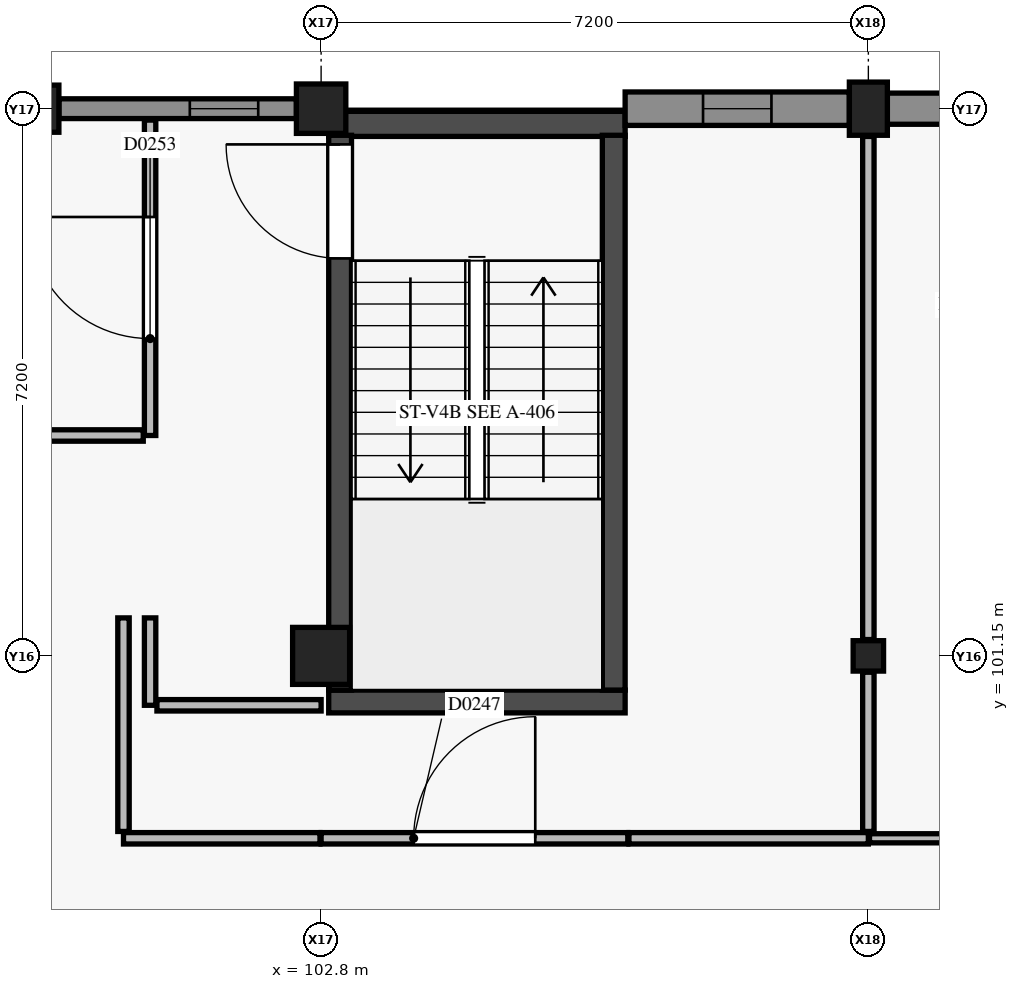
"""IFC4 building model, lengths in metres.
Left out: names, types, materials, properties, quantities, classifications, styles, units other than length and angle.
Written with IfcOpenShell. Run it as: python <this file> out.ifc"""

import sys

from ifc_helpers import new_model, si_unit, direction, frame, frame_2d, origin, origin_2d, place, context, subcontext, project, spatial, rectangle, circle, extrude, element, fill, save


model = new_model("IFC4")
c1 = context("Model", 3, precision=1e-05, world=origin(), true_north=direction((0.0, 1.0)))
c2 = subcontext(c1, "Body", "Model", "MODEL_VIEW")
j1 = project(units=[si_unit("LENGTHUNIT", "METRE"), si_unit("PLANEANGLEUNIT", "RADIAN")], contexts=[c1])
p1 = place(None, origin())
s1 = spatial("IfcSite", under=j1, at=p1, CompositionType="ELEMENT")
p2 = place(p1, origin())
s2 = spatial("IfcBuilding", under=s1, at=p2, CompositionType="ELEMENT")
p3 = place(p2, frame((0.0, 0.0, 9.0)))
s3 = spatial("IfcBuildingStorey", under=s2, at=p3, CompositionType="ELEMENT", Elevation=9.0)
p4 = place(p3, frame((102.8, 101.15, 0.0), z_axis=(0.0, 0.0, 1.0), x_axis=(1.0, 0.0, 0.0)))
e1 = element("IfcColumn", 1, at=p4, inside=s3, PredefinedType="COLUMN", context=c2, shape_type="SweptSolid", body=[
    extrude(rectangle(XDim=0.75, YDim=0.75, at=origin_2d()), origin(), (0.0, 0.0, 1.0), 4.2),
])
p5 = place(p3, frame((102.8, 108.35, 0.0), z_axis=(0.0, 0.0, 1.0), x_axis=(1.0, 0.0, 0.0)))
e2 = element("IfcColumn", 2, at=p5, inside=s3, PredefinedType="COLUMN", context=c2, shape_type="SweptSolid", body=[
    extrude(circle(Radius=0.325, at=origin_2d()), origin(), (0.0, 0.0, 1.0), 4.2),
])
p6 = place(p3, frame((110.0, 101.15, 0.0), z_axis=(0.0, 0.0, 1.0), x_axis=(1.0, 0.0, 0.0)))
e3 = element("IfcColumn", 3, at=p6, inside=s3, PredefinedType="COLUMN", context=c2, shape_type="SweptSolid", body=[
    extrude(rectangle(XDim=0.4, YDim=0.4, at=origin_2d()), origin(), (0.0, 0.0, 1.0), 4.2),
])
p7 = place(p3, frame((110.0, 108.35, 0.0), z_axis=(0.0, 0.0, 1.0), x_axis=(1.0, 0.0, 0.0)))
e4 = element("IfcColumn", 4, at=p7, inside=s3, PredefinedType="COLUMN", context=c2, shape_type="SweptSolid", body=[
    extrude(rectangle(XDim=0.5, YDim=0.7, at=origin_2d()), origin(), (0.0, 0.0, 1.0), 4.2),
])
p8 = place(p3, frame((99.2, 108.35, 0.0), z_axis=(0.0, 0.0, 1.0), x_axis=(1.0, 0.0, 0.0)))
e5 = element("IfcColumn", 5, at=p8, inside=s3, PredefinedType="PILASTER", context=c2, shape_type="SweptSolid", body=[
    extrude(rectangle(XDim=0.3, YDim=0.62, at=origin_2d()), origin(), (0.0, 0.0, 1.0), 4.2),
])
p9 = place(p3, frame((102.9, 100.55, 0.0), z_axis=(0.0, 0.0, 1.0), x_axis=(1.0, 0.0, 0.0)))
e6 = element("IfcWall", 6, at=p9, inside=s3, PredefinedType="SHEAR", context=c2, shape_type="SweptSolid", body=[
    extrude(rectangle(XDim=3.9, YDim=0.3, at=frame_2d((1.95, 0.0))), origin(), (0.0, 0.0, 1.0), 3.95),
])
p10 = place(p3, frame((102.9, 108.15, 0.0), z_axis=(0.0, 0.0, 1.0), x_axis=(1.0, 0.0, 0.0)))
e7 = element("IfcWall", 7, at=p10, inside=s3, PredefinedType="SHEAR", context=c2, shape_type="SweptSolid", body=[
    extrude(rectangle(XDim=3.9, YDim=0.33, at=frame_2d((1.95, 0.0))), origin(), (0.0, 0.0, 1.0), 3.95),
])
p11 = place(p3, frame((103.05, 100.7, 0.0), z_axis=(0.0, 0.0, 1.0), x_axis=(0.0, 1.0, 0.0)))
e8 = element("IfcWall", 8, at=p11, inside=s3, PredefinedType="SHEAR", context=c2, shape_type="SweptSolid", body=[
    extrude(rectangle(XDim=7.3, YDim=0.3, at=frame_2d((3.65, 0.0))), origin(), (0.0, 0.0, 1.0), 3.95),
])
p12 = place(p11, frame((5.68, 0.0, 0.0)))
e9 = element("IfcOpeningElement", 9, at=p12, cuts=e8, PredefinedType="OPENING", context=c2, shape_type="SweptSolid", body=[
    extrude(rectangle(XDim=1.5, YDim=2.15, at=frame_2d((0.75, 1.075))), frame((0.0, 0.16, 0.0), z_axis=(0.0, -1.0, 0.0), x_axis=(1.0, 0.0, 0.0)), (0.0, 0.0, 1.0), 0.32),
])
p13 = place(p3, frame((106.65, 100.7, 0.0), z_axis=(0.0, 0.0, 1.0), x_axis=(0.0, 1.0, 0.0)))
e10 = element("IfcWall", 10, at=p13, inside=s3, PredefinedType="SHEAR", context=c2, shape_type="SweptSolid", body=[
    extrude(rectangle(XDim=7.3, YDim=0.3, at=frame_2d((3.65, 0.0))), origin(), (0.0, 0.0, 1.0), 3.95),
])
p14 = place(p3, frame((99.35, 108.35, 0.0), z_axis=(0.0, 0.0, 1.0), x_axis=(1.0, 0.0, 0.0)))
e11 = element("IfcWall", 11, at=p14, inside=s3, PredefinedType="SOLIDWALL", context=c2, shape_type="SweptSolid", body=[
    extrude(rectangle(XDim=3.125, YDim=0.26, at=frame_2d((1.562, 0.0))), origin(), (0.0, 0.0, 1.0), 3.13),
])
p15 = place(p14, frame((1.722, 0.0, 0.95)))
e12 = element("IfcOpeningElement", 12, at=p15, cuts=e11, PredefinedType="OPENING", context=c2, shape_type="SweptSolid", body=[
    extrude(rectangle(XDim=0.9, YDim=1.2, at=frame_2d((0.45, 0.6))), frame((0.0, 0.14, 0.0), z_axis=(0.0, -1.0, 0.0), x_axis=(1.0, 0.0, 0.0)), (0.0, 0.0, 1.0), 0.28),
])
p16 = place(p3, frame((106.8, 108.35, 0.0), z_axis=(0.0, 0.0, 1.0), x_axis=(1.0, 0.0, 0.0)))
e13 = element("IfcWall", 13, at=p16, inside=s3, PredefinedType="USERDEFINED", context=c2, shape_type="SweptSolid", body=[
    extrude(rectangle(XDim=2.95, YDim=0.44, at=frame_2d((1.475, 0.0))), origin(), (0.0, 0.0, 1.0), 3.13),
])
p17 = place(p16, frame((1.025, 0.0, 0.9)))
e14 = element("IfcOpeningElement", 14, at=p17, cuts=e13, PredefinedType="OPENING", context=c2, shape_type="SweptSolid", body=[
    extrude(rectangle(XDim=0.9, YDim=1.2, at=frame_2d((0.45, 0.6))), frame((0.0, 0.23, 0.0), z_axis=(0.0, -1.0, 0.0), x_axis=(1.0, 0.0, 0.0)), (0.0, 0.0, 1.0), 0.46),
])
p18 = place(p3, frame((110.25, 108.35, 0.0), z_axis=(0.0, 0.0, 1.0), x_axis=(1.0, 0.0, 0.0)))
e15 = element("IfcWall", 15, at=p18, inside=s3, PredefinedType="USERDEFINED", context=c2, shape_type="SweptSolid", body=[
    extrude(rectangle(XDim=3.21, YDim=0.41, at=frame_2d((1.605, 0.0))), origin(), (0.0, 0.0, 1.0), 3.13),
])
p19 = place(p18, frame((0.705, 0.0, 0.9)))
e16 = element("IfcOpeningElement", 16, at=p19, cuts=e15, PredefinedType="OPENING", context=c2, shape_type="SweptSolid", body=[
    extrude(rectangle(XDim=1.8, YDim=0.9, at=frame_2d((0.9, 0.45))), frame((0.0, 0.215, 0.0), z_axis=(0.0, -1.0, 0.0), x_axis=(1.0, 0.0, 0.0)), (0.0, 0.0, 1.0), 0.43),
])
p20 = place(p3, frame((100.55, 100.5, 0.0), z_axis=(0.0, 0.0, 1.0), x_axis=(0.0, 1.0, 0.0)))
e17 = element("IfcWall", 17, at=p20, inside=s3, PredefinedType="PARTITIONING", context=c2, shape_type="SweptSolid", body=[
    extrude(rectangle(XDim=1.15, YDim=0.15, at=frame_2d((0.575, 0.0))), origin(), (0.0, 0.0, 1.0), 3.135),
])
p21 = place(p3, frame((100.64, 100.5, 0.0), z_axis=(0.0, 0.0, 1.0), x_axis=(1.0, 0.0, 0.0)))
e18 = element("IfcWall", 18, at=p21, inside=s3, PredefinedType="PARTITIONING", context=c2, shape_type="SweptSolid", body=[
    extrude(rectangle(XDim=2.16, YDim=0.15, at=frame_2d((1.08, 0.0))), origin(), (0.0, 0.0, 1.0), 3.415),
])
p22 = place(p3, frame((106.85, 98.75, 0.0), z_axis=(0.0, 0.0, 1.0), x_axis=(1.0, 0.0, 0.0)))
e19 = element("IfcWall", 19, at=p22, inside=s3, PredefinedType="PARTITIONING", context=c2, shape_type="SweptSolid", body=[
    extrude(rectangle(XDim=3.15, YDim=0.15, at=frame_2d((1.575, 0.0))), origin(), (0.0, 0.0, 1.0), 3.285),
])
p23 = place(p3, frame((102.8, 98.75, 0.0), z_axis=(0.0, 0.0, 1.0), x_axis=(1.0, 0.0, 0.0)))
e20 = element("IfcWall", 20, at=p23, inside=s3, PredefinedType="PARTITIONING", context=c2, shape_type="SweptSolid", body=[
    extrude(rectangle(XDim=4.035, YDim=0.15, at=frame_2d((2.018, 0.0))), origin(), (0.0, 0.0, 1.0), 3.415),
])
p24 = place(p23, frame((1.218, 0.0, 0.0)))
e21 = element("IfcOpeningElement", 21, at=p24, cuts=e20, PredefinedType="OPENING", context=c2, shape_type="SweptSolid", body=[
    extrude(rectangle(XDim=1.6, YDim=2.25, at=frame_2d((0.8, 1.125))), frame((0.0, 0.085, 0.0), z_axis=(0.0, -1.0, 0.0), x_axis=(1.0, 0.0, 0.0)), (0.0, 0.0, 1.0), 0.17),
])
p25 = place(p3, frame((100.2, 98.75, 0.0), z_axis=(0.0, 0.0, 1.0), x_axis=(1.0, 0.0, 0.0)))
e22 = element("IfcWall", 22, at=p25, inside=s3, PredefinedType="PARTITIONING", context=c2, shape_type="SweptSolid", body=[
    extrude(rectangle(XDim=2.585, YDim=0.15, at=frame_2d((1.292, 0.0))), origin(), (0.0, 0.0, 1.0), 3.415),
])
p26 = place(p3, frame((100.2, 98.84, 0.0), z_axis=(0.0, 0.0, 1.0), x_axis=(0.0, 1.0, 0.0)))
e23 = element("IfcWall", 23, at=p26, inside=s3, PredefinedType="PARTITIONING", context=c2, shape_type="SweptSolid", body=[
    extrude(rectangle(XDim=2.81, YDim=0.15, at=frame_2d((1.405, 0.0))), origin(), (0.0, 0.0, 1.0), 3.135),
])
p27 = place(p3, frame((100.55, 104.05, 0.0), z_axis=(0.0, 0.0, 1.0), x_axis=(0.0, 1.0, 0.0)))
e24 = element("IfcWall", 24, at=p27, inside=s3, PredefinedType="PARTITIONING", context=c2, shape_type="SweptSolid", body=[
    extrude(rectangle(XDim=4.15, YDim=0.15, at=frame_2d((2.075, 0.0))), origin(), (0.0, 0.0, 1.0), 3.475),
])
p28 = place(p27, frame((1.275, 0.0, 0.0)))
e25 = element("IfcOpeningElement", 25, at=p28, cuts=e24, PredefinedType="OPENING", context=c2, shape_type="SweptSolid", body=[
    extrude(rectangle(XDim=1.6, YDim=2.25, at=frame_2d((0.8, 1.125))), frame((0.0, 0.085, 0.0), z_axis=(0.0, -1.0, 0.0), x_axis=(1.0, 0.0, 0.0)), (0.0, 0.0, 1.0), 0.17),
])
p29 = place(p3, frame((99.05, 104.05, 0.0), z_axis=(0.0, 0.0, 1.0), x_axis=(1.0, 0.0, 0.0)))
e26 = element("IfcWall", 26, at=p29, inside=s3, PredefinedType="PARTITIONING", context=c2, shape_type="SweptSolid", body=[
    extrude(rectangle(XDim=1.41, YDim=0.15, at=frame_2d((0.705, 0.0))), origin(), (0.0, 0.0, 1.0), 3.95),
])
p30 = place(p3, frame((110.015, 98.75, 0.0), z_axis=(0.0, 0.0, 1.0), x_axis=(1.0, 0.0, 0.0)))
e27 = element("IfcWall", 27, at=p30, inside=s3, PredefinedType="PARTITIONING", context=c2, shape_type="SweptSolid", body=[
    extrude(rectangle(XDim=2.31, YDim=0.12, at=frame_2d((1.155, 0.0))), origin(), (0.0, 0.0, 1.0), 3.285),
])
p31 = place(p3, frame((110.0, 98.84, 0.0), z_axis=(0.0, 0.0, 1.0), x_axis=(0.0, 1.0, 0.0)))
e28 = element("IfcWall", 28, at=p31, inside=s3, PredefinedType="PARTITIONING", context=c2, shape_type="SweptSolid", body=[
    extrude(rectangle(XDim=2.095, YDim=0.15, at=frame_2d((1.047, 0.0))), origin(), (0.0, 0.0, 1.0), 3.285),
])
p32 = place(p3, frame((110.0, 101.365, 0.0), z_axis=(0.0, 0.0, 1.0), x_axis=(0.0, 1.0, 0.0)))
e29 = element("IfcWall", 29, at=p32, inside=s3, PredefinedType="PARTITIONING", context=c2, shape_type="SweptSolid", body=[
    extrude(rectangle(XDim=6.62, YDim=0.15, at=frame_2d((3.31, 0.0))), origin(), (0.0, 0.0, 1.0), 3.285),
])
p33 = place(p15, origin())
e30 = element("IfcWindow", 30, at=p33, inside=s3, PartitioningType="SINGLE_PANEL", PredefinedType="WINDOW", context=c2, shape_type="SweptSolid", body=[
    extrude(rectangle(XDim=0.9, YDim=1.2, at=frame_2d((0.45, 0.6))), frame((0.0, 0.03, 0.0), z_axis=(0.0, -1.0, 0.0), x_axis=(1.0, 0.0, 0.0)), (0.0, 0.0, 1.0), 0.06),
])
fill(e12, e30)
p34 = place(p17, origin())
e31 = element("IfcWindow", 31, at=p34, inside=s3, PartitioningType="SINGLE_PANEL", PredefinedType="WINDOW", context=c2, shape_type="SweptSolid", body=[
    extrude(rectangle(XDim=0.9, YDim=1.2, at=frame_2d((0.45, 0.6))), frame((0.0, 0.03, 0.0), z_axis=(0.0, -1.0, 0.0), x_axis=(1.0, 0.0, 0.0)), (0.0, 0.0, 1.0), 0.06),
])
fill(e14, e31)
p35 = place(p12, origin())
e32 = element("IfcDoor", 32, at=p35, inside=s3, OperationType="SINGLE_SWING_RIGHT", PredefinedType="DOOR", context=c2, shape_type="SweptSolid", body=[
    extrude(rectangle(XDim=1.5, YDim=2.15, at=frame_2d((0.75, 1.075))), frame((0.0, 0.025, 0.0), z_axis=(0.0, -1.0, 0.0), x_axis=(1.0, 0.0, 0.0)), (0.0, 0.0, 1.0), 0.05),
])
fill(e9, e32)
p36 = place(p24, origin())
e33 = element("IfcDoor", 33, at=p36, inside=s3, OperationType="SINGLE_SWING_RIGHT", PredefinedType="DOOR", context=c2, shape_type="SweptSolid", body=[
    extrude(rectangle(XDim=1.6, YDim=2.25, at=frame_2d((0.8, 1.125))), frame((0.0, 0.025, 0.0), z_axis=(0.0, -1.0, 0.0), x_axis=(1.0, 0.0, 0.0)), (0.0, 0.0, 1.0), 0.05),
])
fill(e21, e33)
p37 = place(p28, origin())
e34 = element("IfcDoor", 34, at=p37, inside=s3, OperationType="SINGLE_SWING_RIGHT", PredefinedType="DOOR", context=c2, shape_type="SweptSolid", body=[
    extrude(rectangle(XDim=1.6, YDim=2.25, at=frame_2d((0.8, 1.125))), frame((0.0, 0.025, 0.0), z_axis=(0.0, -1.0, 0.0), x_axis=(1.0, 0.0, 0.0)), (0.0, 0.0, 1.0), 0.05),
])
fill(e25, e34)
save(model, sys.argv[1])
